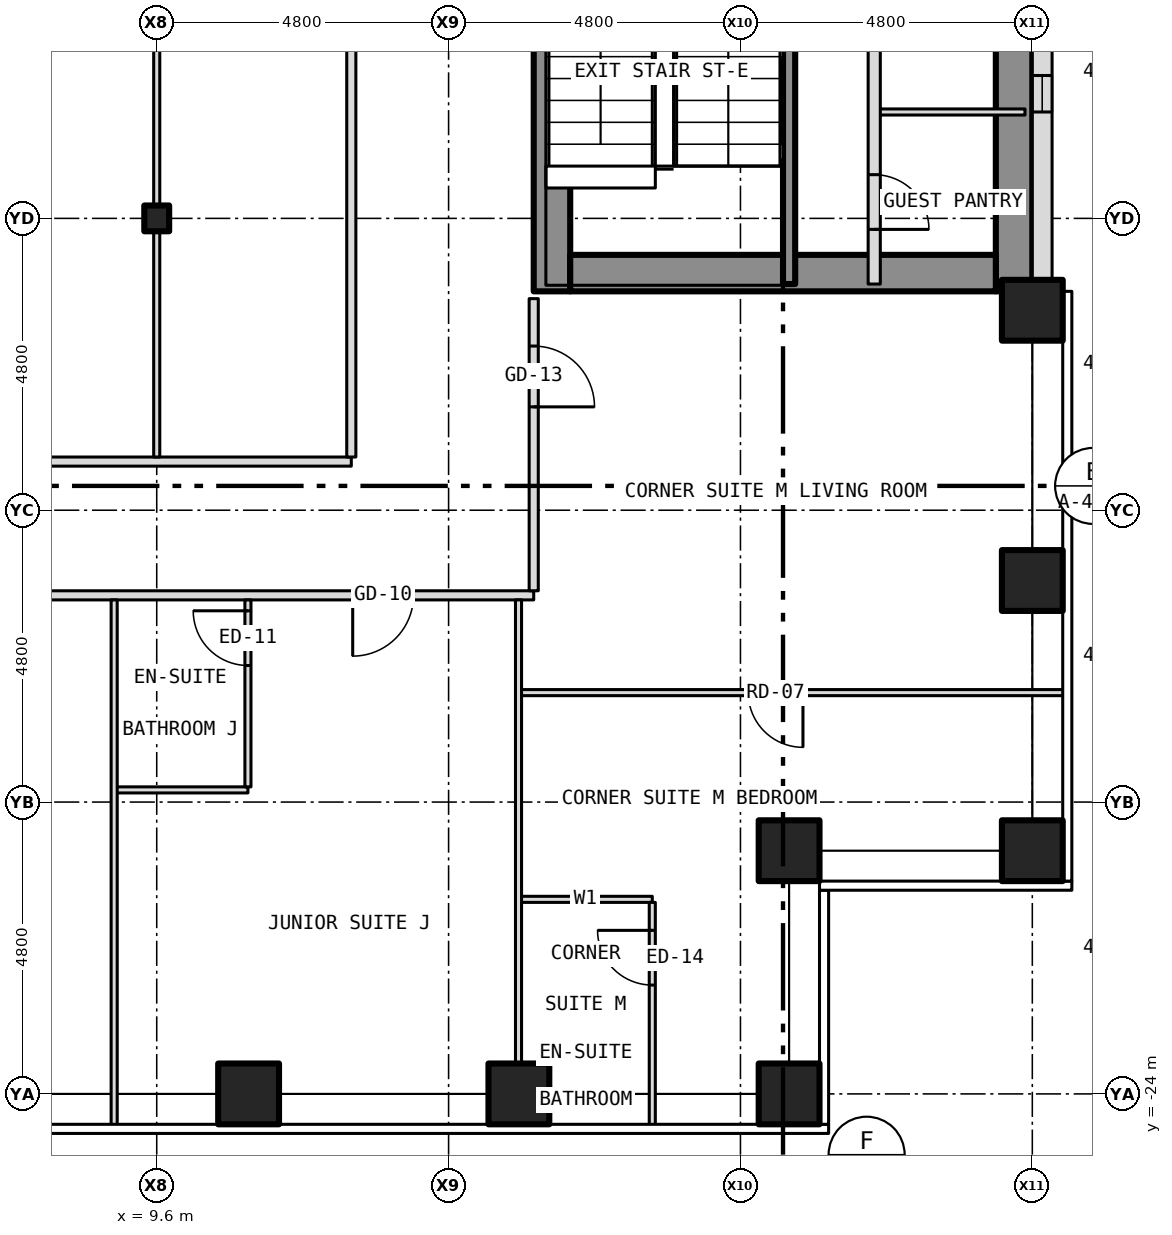
"""IFC4 building model, lengths in metres.
Left out: names, types, materials, properties, quantities, classifications, styles, units other than length and angle.
Written with IfcOpenShell. Run it as: python <this file> out.ifc"""

import sys

from ifc_helpers import new_model, si_unit, direction, frame, frame_2d, origin, origin_2d, place, context, subcontext, project, spatial, rectangle, hollow_rectangle, i_section, extrude, element, fill, save


model = new_model("IFC4")
c1 = context("Model", 3, precision=1e-05, world=origin(), true_north=direction((0.0, 1.0)))
c2 = subcontext(c1, "Body", "Model", "MODEL_VIEW")
j1 = project(units=[si_unit("LENGTHUNIT", "METRE"), si_unit("PLANEANGLEUNIT", "RADIAN")], contexts=[c1])
p1 = place(None, origin())
s1 = spatial("IfcSite", under=j1, at=p1, CompositionType="ELEMENT")
p2 = place(p1, origin())
s2 = spatial("IfcBuilding", under=s1, at=p2, CompositionType="ELEMENT")
p3 = place(p2, frame((0.0, 0.0, 42.5)))
s3 = spatial("IfcBuildingStorey", under=s2, at=p3, CompositionType="ELEMENT", Elevation=42.5)
for number, where, z_axis, x_axis in (
    (1, (11.111, -24.0, -0.15), (0.0, 0.0, 1.0), (1.0, 0.0, 0.0)),
    (2, (15.556, -24.0, -0.15), (0.0, 0.0, 1.0), (1.0, 0.0, 0.0)),
    (3, (20.0, -24.0, -0.15), (0.0, 0.0, 1.0), (1.0, 0.0, 0.0)),
    (4, (24.0, -20.0, -0.15), (0.0, 0.0, 1.0), (1.0, 0.0, 0.0)),
    (5, (24.0, -15.556, -0.15), (0.0, 0.0, 1.0), (1.0, 0.0, 0.0)),
    (6, (24.0, -11.111, -0.15), (0.0, 0.0, 1.0), (1.0, 0.0, 0.0)),
    (7, (20.0, -20.0, -0.15), (0.0, 0.0, 1.0), (1.0, 0.0, 0.0)),
):
    element("IfcColumn", number, at=place(p3, frame(where, z_axis=z_axis, x_axis=x_axis)), inside=s3, PredefinedType="COLUMN", context=c2, shape_type="SweptSolid", body=[
        extrude(hollow_rectangle(XDim=1.0, YDim=1.0, WallThickness=0.06, at=origin_2d()), origin(), (0.0, 0.0, 1.0), 3.5),
    ])
p4 = place(p3, frame((9.6, -9.6, -0.15), z_axis=(0.0, 0.0, 1.0), x_axis=(1.0, 0.0, 0.0)))
e8 = element("IfcColumn", 8, at=p4, inside=s3, PredefinedType="COLUMN", context=c2, shape_type="SweptSolid", body=[
    extrude(i_section(OverallWidth=0.409, OverallDepth=0.424, WebThickness=0.033, FlangeThickness=0.052, at=origin_2d()), origin(), (0.0, 0.0, 1.0), 3.5),
])
p5 = place(p3, frame((16.1, -10.8, 0.0), z_axis=(0.0, 0.0, 1.0), x_axis=(0.0, 1.0, 0.0)))
e9 = element("IfcWall", 9, at=p5, inside=s3, PredefinedType="SHEAR", context=c2, shape_type="SweptSolid", body=[
    extrude(rectangle(XDim=21.6, YDim=0.6, at=frame_2d((10.8, 0.0))), origin(), (0.0, 0.0, 1.0), 3.25),
])
p6 = place(p5, frame((9.4, 0.0, 0.0)))
e10 = element("IfcOpeningElement", 10, at=p6, cuts=e9, PredefinedType="OPENING", context=c2, shape_type="SweptSolid", body=[
    extrude(rectangle(XDim=1.1, YDim=2.1, at=frame_2d((0.55, 1.05))), frame((0.0, 0.312, 0.0), z_axis=(0.0, -1.0, 0.0), x_axis=(1.0, 0.0, 0.0)), (0.0, 0.0, 1.0), 0.624),
])
p7 = place(p5, frame((11.5, 0.0, 0.0)))
e11 = element("IfcOpeningElement", 11, at=p7, cuts=e9, PredefinedType="OPENING", context=c2, shape_type="SweptSolid", body=[
    extrude(rectangle(XDim=1.1, YDim=2.1, at=frame_2d((0.55, 1.05))), frame((0.0, 0.312, 0.0), z_axis=(0.0, -1.0, 0.0), x_axis=(1.0, 0.0, 0.0)), (0.0, 0.0, 1.0), 0.624),
])
p8 = place(p5, frame((13.6, 0.0, 0.0)))
e12 = element("IfcOpeningElement", 12, at=p8, cuts=e9, PredefinedType="OPENING", context=c2, shape_type="SweptSolid", body=[
    extrude(rectangle(XDim=1.1, YDim=2.1, at=frame_2d((0.55, 1.05))), frame((0.0, 0.312, 0.0), z_axis=(0.0, -1.0, 0.0), x_axis=(1.0, 0.0, 0.0)), (0.0, 0.0, 1.0), 0.624),
])
p9 = place(p5, frame((15.7, 0.0, 0.0)))
e13 = element("IfcOpeningElement", 13, at=p9, cuts=e9, PredefinedType="OPENING", context=c2, shape_type="SweptSolid", body=[
    extrude(rectangle(XDim=1.1, YDim=2.1, at=frame_2d((0.55, 1.05))), frame((0.0, 0.312, 0.0), z_axis=(0.0, -1.0, 0.0), x_axis=(1.0, 0.0, 0.0)), (0.0, 0.0, 1.0), 0.624),
])
p10 = place(p5, frame((17.8, 0.0, 0.0)))
e14 = element("IfcOpeningElement", 14, at=p10, cuts=e9, PredefinedType="OPENING", context=c2, shape_type="SweptSolid", body=[
    extrude(rectangle(XDim=1.1, YDim=2.1, at=frame_2d((0.55, 1.05))), frame((0.0, 0.312, 0.0), z_axis=(0.0, -1.0, 0.0), x_axis=(1.0, 0.0, 0.0)), (0.0, 0.0, 1.0), 0.624),
])
p11 = place(p5, frame((5.642, 0.0, 0.0)))
e15 = element("IfcOpeningElement", 15, at=p11, cuts=e9, PredefinedType="OPENING", context=c2, shape_type="SweptSolid", body=[
    extrude(rectangle(XDim=1.1, YDim=2.1, at=frame_2d((0.55, 1.05))), frame((0.0, 0.312, 0.0), z_axis=(0.0, -1.0, 0.0), x_axis=(1.0, 0.0, 0.0)), (0.0, 0.0, 1.0), 0.624),
])
p12 = place(p5, frame((7.5, 0.0, 0.0)))
e16 = element("IfcOpeningElement", 16, at=p12, cuts=e9, PredefinedType="OPENING", context=c2, shape_type="SweptSolid", body=[
    extrude(rectangle(XDim=1.1, YDim=2.1, at=frame_2d((0.55, 1.05))), frame((0.0, 0.312, 0.0), z_axis=(0.0, -1.0, 0.0), x_axis=(1.0, 0.0, 0.0)), (0.0, 0.0, 1.0), 0.624),
])
p13 = place(p3, frame((23.7, -10.8, 0.0), z_axis=(0.0, 0.0, 1.0), x_axis=(0.0, 1.0, 0.0)))
e17 = element("IfcWall", 17, at=p13, inside=s3, PredefinedType="SHEAR", context=c2, shape_type="SweptSolid", body=[
    extrude(rectangle(XDim=21.6, YDim=0.6, at=frame_2d((10.8, 0.0))), origin(), (0.0, 0.0, 1.0), 3.25),
])
p14 = place(p3, frame((16.4, -10.5, 0.0), z_axis=(0.0, 0.0, 1.0), x_axis=(1.0, 0.0, 0.0)))
e18 = element("IfcWall", 18, at=p14, inside=s3, PredefinedType="SHEAR", context=c2, shape_type="SweptSolid", body=[
    extrude(rectangle(XDim=7.0, YDim=0.6, at=frame_2d((3.5, 0.0))), origin(), (0.0, 0.0, 1.0), 3.25),
])
p15 = place(p3, frame((24.163, -10.8, 0.0), z_axis=(0.0, 0.0, 1.0), x_axis=(0.0, 1.0, 0.0)))
e19 = element("IfcWall", 19, at=p15, inside=s3, PredefinedType="SOLIDWALL", context=c2, shape_type="SweptSolid", body=[
    extrude(rectangle(XDim=21.6, YDim=0.325, at=frame_2d((10.8, 0.0))), origin(), (0.0, 0.0, 1.0), 3.5),
])
p16 = place(p15, frame((2.95, 0.0, 1.0)))
e20 = element("IfcOpeningElement", 20, at=p16, cuts=e19, PredefinedType="OPENING", context=c2, shape_type="SweptSolid", body=[
    extrude(rectangle(XDim=0.6, YDim=1.5, at=frame_2d((0.3, 0.75))), frame((0.0, 0.175, 0.0), z_axis=(0.0, -1.0, 0.0), x_axis=(1.0, 0.0, 0.0)), (0.0, 0.0, 1.0), 0.349),
])
p17 = place(p3, frame((15.55, -20.8, 0.0), z_axis=(0.0, 0.0, 1.0), x_axis=(1.0, 0.0, 0.0)))
e21 = element("IfcWall", 21, at=p17, inside=s3, PredefinedType="PARTITIONING", context=c2, shape_type="SweptSolid", body=[
    extrude(rectangle(XDim=2.2, YDim=0.1, at=frame_2d((1.1, 0.0))), origin(), (0.0, 0.0, 1.0), 3.35),
])
p18 = place(p3, frame((8.9, -19.0, 0.0), z_axis=(0.0, 0.0, 1.0), x_axis=(1.0, 0.0, 0.0)))
e22 = element("IfcWall", 22, at=p18, inside=s3, PredefinedType="PARTITIONING", context=c2, shape_type="SweptSolid", body=[
    extrude(rectangle(XDim=2.2, YDim=0.1, at=frame_2d((1.1, 0.0))), origin(), (0.0, 0.0, 1.0), 3.35),
])
p19 = place(p3, frame((15.55, -17.4, 0.0), z_axis=(0.0, 0.0, 1.0), x_axis=(1.0, 0.0, 0.0)))
e23 = element("IfcWall", 23, at=p19, inside=s3, PredefinedType="PARTITIONING", context=c2, shape_type="SweptSolid", body=[
    extrude(rectangle(XDim=8.98, YDim=0.1, at=frame_2d((4.49, 0.0))), origin(), (0.0, 0.0, 1.0), 3.35),
])
p20 = place(p19, frame((3.778, 0.0, 0.0)))
e24 = element("IfcOpeningElement", 24, at=p20, cuts=e23, PredefinedType="OPENING", context=c2, shape_type="SweptSolid", body=[
    extrude(rectangle(XDim=0.9, YDim=2.1, at=frame_2d((0.45, 1.05))), frame((0.0, 0.062, 0.0), z_axis=(0.0, -1.0, 0.0), x_axis=(1.0, 0.0, 0.0)), (0.0, 0.0, 1.0), 0.124),
])
p21 = place(p3, frame((-15.8, -15.8, 0.0), z_axis=(0.0, 0.0, 1.0), x_axis=(1.0, 0.0, 0.0)))
e25 = element("IfcWall", 25, at=p21, inside=s3, PredefinedType="PARTITIONING", context=c2, shape_type="SweptSolid", body=[
    extrude(rectangle(XDim=31.6, YDim=0.15, at=frame_2d((15.8, 0.0))), origin(), (0.0, 0.0, 1.0), 3.35),
])
p22 = place(p21, frame((6.633, 0.0, 0.0)))
e26 = element("IfcOpeningElement", 26, at=p22, cuts=e25, PredefinedType="OPENING", context=c2, shape_type="SweptSolid", body=[
    extrude(rectangle(XDim=1.0, YDim=2.1, at=frame_2d((0.5, 1.05))), frame((0.0, 0.087, 0.0), z_axis=(0.0, -1.0, 0.0), x_axis=(1.0, 0.0, 0.0)), (0.0, 0.0, 1.0), 0.174),
])
p23 = place(p21, frame((11.956, 0.0, 0.0)))
e27 = element("IfcOpeningElement", 27, at=p23, cuts=e25, PredefinedType="OPENING", context=c2, shape_type="SweptSolid", body=[
    extrude(rectangle(XDim=1.0, YDim=2.1, at=frame_2d((0.5, 1.05))), frame((0.0, 0.087, 0.0), z_axis=(0.0, -1.0, 0.0), x_axis=(1.0, 0.0, 0.0)), (0.0, 0.0, 1.0), 0.174),
])
p24 = place(p21, frame((16.4, 0.0, 0.0)))
e28 = element("IfcOpeningElement", 28, at=p24, cuts=e25, PredefinedType="OPENING", context=c2, shape_type="SweptSolid", body=[
    extrude(rectangle(XDim=1.0, YDim=2.1, at=frame_2d((0.5, 1.05))), frame((0.0, 0.087, 0.0), z_axis=(0.0, -1.0, 0.0), x_axis=(1.0, 0.0, 0.0)), (0.0, 0.0, 1.0), 0.174),
])
p25 = place(p21, frame((21.956, 0.0, 0.0)))
e29 = element("IfcOpeningElement", 29, at=p25, cuts=e25, PredefinedType="OPENING", context=c2, shape_type="SweptSolid", body=[
    extrude(rectangle(XDim=1.0, YDim=2.1, at=frame_2d((0.5, 1.05))), frame((0.0, 0.087, 0.0), z_axis=(0.0, -1.0, 0.0), x_axis=(1.0, 0.0, 0.0)), (0.0, 0.0, 1.0), 0.174),
])
p26 = place(p21, frame((28.623, 0.0, 0.0)))
e30 = element("IfcOpeningElement", 30, at=p26, cuts=e25, PredefinedType="OPENING", context=c2, shape_type="SweptSolid", body=[
    extrude(rectangle(XDim=1.0, YDim=2.1, at=frame_2d((0.5, 1.05))), frame((0.0, 0.087, 0.0), z_axis=(0.0, -1.0, 0.0), x_axis=(1.0, 0.0, 0.0)), (0.0, 0.0, 1.0), 0.174),
])
p27 = place(p3, frame((-12.8, -13.6, 0.0), z_axis=(0.0, 0.0, 1.0), x_axis=(1.0, 0.0, 0.0)))
e31 = element("IfcWall", 31, at=p27, inside=s3, PredefinedType="PARTITIONING", context=c2, shape_type="SweptSolid", body=[
    extrude(rectangle(XDim=25.6, YDim=0.15, at=frame_2d((12.8, 0.0))), origin(), (0.0, 0.0, 1.0), 3.35),
])
p28 = place(p27, frame((12.35, 0.0, 0.0)))
e32 = element("IfcOpeningElement", 32, at=p28, cuts=e31, PredefinedType="OPENING", context=c2, shape_type="SweptSolid", body=[
    extrude(rectangle(XDim=0.9, YDim=2.1, at=frame_2d((0.45, 1.05))), frame((0.0, 0.087, 0.0), z_axis=(0.0, -1.0, 0.0), x_axis=(1.0, 0.0, 0.0)), (0.0, 0.0, 1.0), 0.174),
])
p29 = place(p3, frame((21.4, -7.85, 0.0), z_axis=(0.0, 0.0, 1.0), x_axis=(1.0, 0.0, 0.0)))
e33 = element("IfcWall", 33, at=p29, inside=s3, PredefinedType="PARTITIONING", context=c2, shape_type="SweptSolid", body=[
    extrude(rectangle(XDim=2.48, YDim=0.1, at=frame_2d((1.24, 0.0))), origin(), (0.0, 0.0, 1.0), 3.25),
])
p30 = place(p3, frame((8.9, -24.53, 0.0), z_axis=(0.0, 0.0, 1.0), x_axis=(0.0, 1.0, 0.0)))
e34 = element("IfcWall", 34, at=p30, inside=s3, PredefinedType="PARTITIONING", context=c2, shape_type="SweptSolid", body=[
    extrude(rectangle(XDim=8.655, YDim=0.1, at=frame_2d((4.328, 0.0))), origin(), (0.0, 0.0, 1.0), 3.35),
])
p31 = place(p3, frame((9.6, -13.525, 0.0), z_axis=(0.0, 0.0, 1.0), x_axis=(0.0, 1.0, 0.0)))
e35 = element("IfcWall", 35, at=p31, inside=s3, PredefinedType="PARTITIONING", context=c2, shape_type="SweptSolid", body=[
    extrude(rectangle(XDim=3.721, YDim=0.1, at=frame_2d((1.86, 0.0))), origin(), (0.0, 0.0, 1.0), 2.728),
])
p32 = place(p3, frame((9.6, -9.804, 0.0), z_axis=(0.0, 0.0, 1.0), x_axis=(0.0, 1.0, 0.0)))
e36 = element("IfcWall", 36, at=p32, inside=s3, PredefinedType="PARTITIONING", context=c2, shape_type="SweptSolid", body=[
    extrude(rectangle(XDim=0.408, YDim=0.1, at=frame_2d((0.204, 0.0))), origin(), (0.0, 0.0, 1.0), 3.35),
])
p33 = place(p3, frame((9.6, -9.396, 0.0), z_axis=(0.0, 0.0, 1.0), x_axis=(0.0, 1.0, 0.0)))
e37 = element("IfcWall", 37, at=p33, inside=s3, PredefinedType="PARTITIONING", context=c2, shape_type="SweptSolid", body=[
    extrude(rectangle(XDim=9.192, YDim=0.1, at=frame_2d((4.596, 0.0))), origin(), (0.0, 0.0, 1.0), 2.728),
])
p34 = place(p3, frame((11.1, -18.95, 0.0), z_axis=(0.0, 0.0, 1.0), x_axis=(0.0, 1.0, 0.0)))
e38 = element("IfcWall", 38, at=p34, inside=s3, PredefinedType="PARTITIONING", context=c2, shape_type="SweptSolid", body=[
    extrude(rectangle(XDim=3.075, YDim=0.1, at=frame_2d((1.538, 0.0))), origin(), (0.0, 0.0, 1.0), 3.35),
])
p35 = place(p34, frame((1.996, 0.0, 0.0)))
e39 = element("IfcOpeningElement", 39, at=p35, cuts=e38, PredefinedType="OPENING", context=c2, shape_type="SweptSolid", body=[
    extrude(rectangle(XDim=0.9, YDim=2.1, at=frame_2d((0.45, 1.05))), frame((0.0, 0.062, 0.0), z_axis=(0.0, -1.0, 0.0), x_axis=(1.0, 0.0, 0.0)), (0.0, 0.0, 1.0), 0.124),
])
p36 = place(p3, frame((12.8, -13.525, 0.0), z_axis=(0.0, 0.0, 1.0), x_axis=(0.0, 1.0, 0.0)))
e40 = element("IfcWall", 40, at=p36, inside=s3, PredefinedType="PARTITIONING", context=c2, shape_type="SweptSolid", body=[
    extrude(rectangle(XDim=11.525, YDim=0.15, at=frame_2d((5.762, 0.0))), origin(), (0.0, 0.0, 1.0), 3.35),
])
p37 = place(p36, frame((6.725, 0.0, 0.0)))
e41 = element("IfcOpeningElement", 41, at=p37, cuts=e40, PredefinedType="OPENING", context=c2, shape_type="SweptSolid", body=[
    extrude(rectangle(XDim=0.9, YDim=2.1, at=frame_2d((0.45, 1.05))), frame((0.0, 0.087, 0.0), z_axis=(0.0, -1.0, 0.0), x_axis=(1.0, 0.0, 0.0)), (0.0, 0.0, 1.0), 0.174),
])
p38 = place(p3, frame((15.55, -23.88, 0.0), z_axis=(0.0, 0.0, 1.0), x_axis=(0.0, 1.0, 0.0)))
e42 = element("IfcWall", 42, at=p38, inside=s3, PredefinedType="PARTITIONING", context=c2, shape_type="SweptSolid", body=[
    extrude(rectangle(XDim=8.005, YDim=0.1, at=frame_2d((4.002, 0.0))), origin(), (0.0, 0.0, 1.0), 3.35),
])
p39 = place(p3, frame((15.8, -15.725, 0.0), z_axis=(0.0, 0.0, 1.0), x_axis=(0.0, 1.0, 0.0)))
e43 = element("IfcWall", 43, at=p39, inside=s3, PredefinedType="PARTITIONING", context=c2, shape_type="SweptSolid", body=[
    extrude(rectangle(XDim=4.805, YDim=0.15, at=frame_2d((2.403, 0.0))), origin(), (0.0, 0.0, 1.0), 3.35),
])
p40 = place(p39, frame((3.025, 0.0, 0.0)))
e44 = element("IfcOpeningElement", 44, at=p40, cuts=e43, PredefinedType="OPENING", context=c2, shape_type="SweptSolid", body=[
    extrude(rectangle(XDim=1.0, YDim=2.1, at=frame_2d((0.5, 1.05))), frame((0.0, 0.087, 0.0), z_axis=(0.0, -1.0, 0.0), x_axis=(1.0, 0.0, 0.0)), (0.0, 0.0, 1.0), 0.174),
])
p41 = place(p3, frame((17.75, -24.53, 0.0), z_axis=(0.0, 0.0, 1.0), x_axis=(0.0, 1.0, 0.0)))
e45 = element("IfcWall", 45, at=p41, inside=s3, PredefinedType="PARTITIONING", context=c2, shape_type="SweptSolid", body=[
    extrude(rectangle(XDim=3.68, YDim=0.1, at=frame_2d((1.84, 0.0))), origin(), (0.0, 0.0, 1.0), 3.35),
])
p42 = place(p41, frame((2.32, 0.0, 0.0)))
e46 = element("IfcOpeningElement", 46, at=p42, cuts=e45, PredefinedType="OPENING", context=c2, shape_type="SweptSolid", body=[
    extrude(rectangle(XDim=0.9, YDim=2.1, at=frame_2d((0.45, 1.05))), frame((0.0, 0.062, 0.0), z_axis=(0.0, -1.0, 0.0), x_axis=(1.0, 0.0, 0.0)), (0.0, 0.0, 1.0), 0.124),
])
p43 = place(p3, frame((20.0, -10.68, 0.0), z_axis=(0.0, 0.0, 1.0), x_axis=(0.0, 1.0, 0.0)))
e47 = element("IfcWall", 47, at=p43, inside=s3, PredefinedType="SHEAR", context=c2, shape_type="SweptSolid", body=[
    extrude(rectangle(XDim=6.98, YDim=0.2, at=frame_2d((3.49, 0.0))), origin(), (0.0, 0.0, 1.0), 3.25),
])
p44 = place(p3, frame((21.4, -10.68, 0.0), z_axis=(0.0, 0.0, 1.0), x_axis=(0.0, 1.0, 0.0)))
e48 = element("IfcWall", 48, at=p44, inside=s3, PredefinedType="PARTITIONING", context=c2, shape_type="SweptSolid", body=[
    extrude(rectangle(XDim=8.68, YDim=0.2, at=frame_2d((4.34, 0.0))), origin(), (0.0, 0.0, 1.0), 3.25),
])
p45 = place(p44, frame((0.899, 0.0, 0.0)))
e49 = element("IfcOpeningElement", 49, at=p45, cuts=e48, PredefinedType="OPENING", context=c2, shape_type="SweptSolid", body=[
    extrude(rectangle(XDim=0.9, YDim=2.1, at=frame_2d((0.45, 1.05))), frame((0.0, 0.112, 0.0), z_axis=(0.0, -1.0, 0.0), x_axis=(1.0, 0.0, 0.0)), (0.0, 0.0, 1.0), 0.224),
])
p46 = place(p44, frame((5.349, 0.0, 0.0)))
e50 = element("IfcOpeningElement", 50, at=p46, cuts=e48, PredefinedType="OPENING", context=c2, shape_type="SweptSolid", body=[
    extrude(rectangle(XDim=0.9, YDim=2.1, at=frame_2d((0.45, 1.05))), frame((0.0, 0.112, 0.0), z_axis=(0.0, -1.0, 0.0), x_axis=(1.0, 0.0, 0.0)), (0.0, 0.0, 1.0), 0.224),
])
p47 = place(p16, origin())
e51 = element("IfcWindow", 51, at=p47, inside=s3, PartitioningType="SINGLE_PANEL", PredefinedType="WINDOW", context=c2, shape_type="SweptSolid", body=[
    extrude(rectangle(XDim=0.6, YDim=1.5, at=frame_2d((0.3, 0.75))), frame((0.0, -0.073, 0.0), z_axis=(0.0, -1.0, 0.0), x_axis=(1.0, 0.0, 0.0)), (0.0, 0.0, 1.0), 0.06),
])
fill(e20, e51)
p48 = place(p45, origin())
e52 = element("IfcDoor", 52, at=p48, inside=s3, OperationType="SINGLE_SWING_LEFT", PredefinedType="DOOR", context=c2, shape_type="SweptSolid", body=[
    extrude(rectangle(XDim=0.9, YDim=2.1, at=frame_2d((0.45, 1.05))), frame((0.0, 0.025, 0.0), z_axis=(0.0, -1.0, 0.0), x_axis=(1.0, 0.0, 0.0)), (0.0, 0.0, 1.0), 0.05),
])
fill(e49, e52)
p49 = place(p26, origin())
e53 = element("IfcDoor", 53, at=p49, inside=s3, OperationType="SINGLE_SWING_LEFT", PredefinedType="DOOR", context=c2, shape_type="SweptSolid", body=[
    extrude(rectangle(XDim=1.0, YDim=2.1, at=frame_2d((0.5, 1.05))), frame((0.0, 0.025, 0.0), z_axis=(0.0, -1.0, 0.0), x_axis=(1.0, 0.0, 0.0)), (0.0, 0.0, 1.0), 0.05),
])
fill(e30, e53)
p50 = place(p35, origin())
e54 = element("IfcDoor", 54, at=p50, inside=s3, OperationType="SINGLE_SWING_RIGHT", PredefinedType="DOOR", context=c2, shape_type="SweptSolid", body=[
    extrude(rectangle(XDim=0.9, YDim=2.1, at=frame_2d((0.45, 1.05))), frame((0.0, 0.025, 0.0), z_axis=(0.0, -1.0, 0.0), x_axis=(1.0, 0.0, 0.0)), (0.0, 0.0, 1.0), 0.05),
])
fill(e39, e54)
p51 = place(p40, origin())
e55 = element("IfcDoor", 55, at=p51, inside=s3, OperationType="SINGLE_SWING_LEFT", PredefinedType="DOOR", context=c2, shape_type="SweptSolid", body=[
    extrude(rectangle(XDim=1.0, YDim=2.1, at=frame_2d((0.5, 1.05))), frame((0.0, 0.025, 0.0), z_axis=(0.0, -1.0, 0.0), x_axis=(1.0, 0.0, 0.0)), (0.0, 0.0, 1.0), 0.05),
])
fill(e44, e55)
p52 = place(p20, origin())
e56 = element("IfcDoor", 56, at=p52, inside=s3, OperationType="SINGLE_SWING_RIGHT", PredefinedType="DOOR", context=c2, shape_type="SweptSolid", body=[
    extrude(rectangle(XDim=0.9, YDim=2.1, at=frame_2d((0.45, 1.05))), frame((0.0, 0.025, 0.0), z_axis=(0.0, -1.0, 0.0), x_axis=(1.0, 0.0, 0.0)), (0.0, 0.0, 1.0), 0.05),
])
fill(e24, e56)
p53 = place(p42, origin())
e57 = element("IfcDoor", 57, at=p53, inside=s3, OperationType="SINGLE_SWING_RIGHT", PredefinedType="DOOR", context=c2, shape_type="SweptSolid", body=[
    extrude(rectangle(XDim=0.9, YDim=2.1, at=frame_2d((0.45, 1.05))), frame((0.0, 0.025, 0.0), z_axis=(0.0, -1.0, 0.0), x_axis=(1.0, 0.0, 0.0)), (0.0, 0.0, 1.0), 0.05),
])
fill(e46, e57)
save(model, sys.argv[1])
